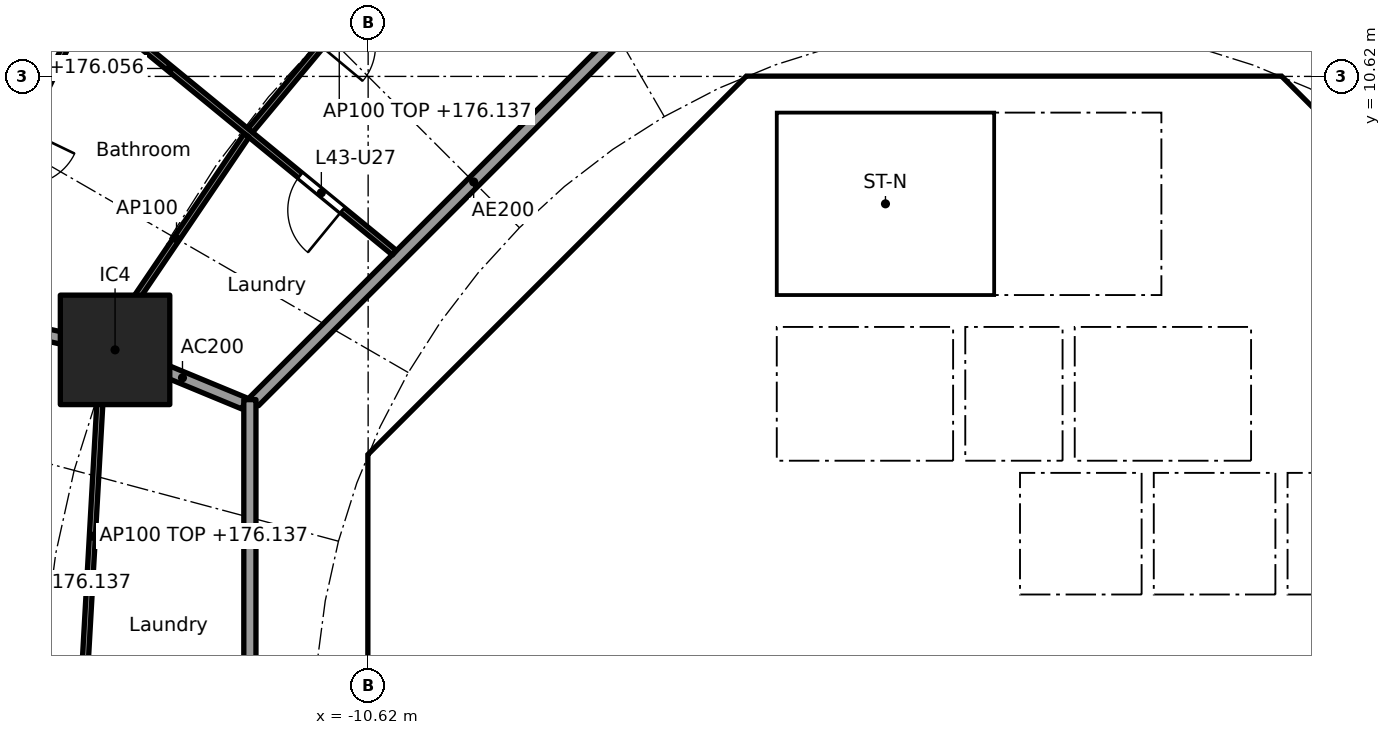
"""IFC4 building model, lengths in metres.
Left out: names, types, materials, properties, quantities, classifications, styles, units other than length and angle.
Written with IfcOpenShell. Run it as: python <this file> out.ifc"""

import sys

from ifc_helpers import new_model, si_unit, direction, frame, frame_2d, origin, origin_2d, place, context, subcontext, project, spatial, polyline, rectangle, outline, extrude, element, fill, save


model = new_model("IFC4")
c1 = context("Model", 3, precision=1e-05, world=origin(), true_north=direction((0.0, 1.0)))
c2 = subcontext(c1, "Body", "Model", "MODEL_VIEW")
j1 = project(units=[si_unit("LENGTHUNIT", "METRE"), si_unit("PLANEANGLEUNIT", "RADIAN")], contexts=[c1])
p1 = place(None, origin())
s1 = spatial("IfcSite", under=j1, at=p1, CompositionType="ELEMENT")
p2 = place(p1, origin())
s2 = spatial("IfcBuilding", under=s1, at=p2, CompositionType="ELEMENT")
p3 = place(p2, frame((0.0, 0.0, 173.3)))
s3 = spatial("IfcBuildingStorey", under=s2, at=p3, CompositionType="ELEMENT", Elevation=173.3)
p4 = place(p3, frame((-14.782, 6.123, 0.0), z_axis=(0.0, 0.0, 1.0), x_axis=(1.0, 0.0, 0.0)))
e1 = element("IfcColumn", 1, at=p4, inside=s3, PredefinedType="COLUMN", context=c2, shape_type="SweptSolid", body=[
    extrude(rectangle(XDim=1.8, YDim=1.8, at=origin_2d()), origin(), (0.0, 0.0, 1.0), 3.7),
])
p5 = place(p3, frame((9.988, 4.613, 0.0), z_axis=(0.0, 0.0, 1.0), x_axis=(-0.707106781187, 0.707106781187, 0.0)))
e2 = element("IfcWall", 2, at=p5, inside=s3, PredefinedType="SHEAR", context=c2, shape_type="SweptSolid", body=[
    extrude(rectangle(XDim=7.602, YDim=0.6, at=frame_2d((3.801, 0.0))), origin(), (0.0, 0.0, 1.0), 3.44),
])
p6 = place(p5, frame((3.201, 0.0, 0.0)))
e3 = element("IfcOpeningElement", 3, at=p6, cuts=e2, PredefinedType="OPENING", context=c2, shape_type="SweptSolid", body=[
    extrude(rectangle(XDim=1.2, YDim=2.1, at=frame_2d((0.6, 1.05))), frame((0.0, 0.31, 0.0), z_axis=(0.0, -1.0, 0.0), x_axis=(1.0, 0.0, 0.0)), (0.0, 0.0, 1.0), 0.62),
])
p7 = place(p3, frame((-4.613, 9.988, 0.0), z_axis=(0.0, 0.0, 1.0), x_axis=(-0.707106781187, -0.707106781187, 0.0)))
e4 = element("IfcWall", 4, at=p7, inside=s3, PredefinedType="SHEAR", context=c2, shape_type="SweptSolid", body=[
    extrude(rectangle(XDim=7.602, YDim=0.6, at=frame_2d((3.801, 0.0))), origin(), (0.0, 0.0, 1.0), 3.44),
])
p8 = place(p7, frame((0.351, 0.0, 0.0)))
e5 = element("IfcOpeningElement", 5, at=p8, cuts=e4, PredefinedType="OPENING", context=c2, shape_type="SweptSolid", body=[
    extrude(rectangle(XDim=1.1, YDim=2.1, at=frame_2d((0.55, 1.05))), frame((0.0, 0.31, 0.0), z_axis=(0.0, -1.0, 0.0), x_axis=(1.0, 0.0, 0.0)), (0.0, 0.0, 1.0), 0.62),
])
p9 = place(p3, frame((-10.325, 3.801, 0.0), z_axis=(0.0, 0.0, 1.0), x_axis=(0.0, -1.0, 0.0)))
e6 = element("IfcWall", 6, at=p9, inside=s3, PredefinedType="SHEAR", context=c2, shape_type="SweptSolid", body=[
    extrude(rectangle(XDim=7.602, YDim=0.6, at=frame_2d((3.801, 0.0))), origin(), (0.0, 0.0, 1.0), 3.44),
])
p10 = place(p9, frame((0.651, 0.0, 0.0)))
e7 = element("IfcOpeningElement", 7, at=p10, cuts=e6, PredefinedType="OPENING", context=c2, shape_type="SweptSolid", body=[
    extrude(rectangle(XDim=1.5, YDim=2.1, at=frame_2d((0.75, 1.05))), frame((0.0, 0.31, 0.0), z_axis=(0.0, -1.0, 0.0), x_axis=(1.0, 0.0, 0.0)), (0.0, 0.0, 1.0), 0.62),
])
p11 = place(p9, frame((5.451, 0.0, 0.0)))
e8 = element("IfcOpeningElement", 8, at=p11, cuts=e6, PredefinedType="OPENING", context=c2, shape_type="SweptSolid", body=[
    extrude(rectangle(XDim=1.5, YDim=2.1, at=frame_2d((0.75, 1.05))), frame((0.0, 0.31, 0.0), z_axis=(0.0, -1.0, 0.0), x_axis=(1.0, 0.0, 0.0)), (0.0, 0.0, 1.0), 0.62),
])
p12 = place(p3, frame((-5.8, 4.3, 0.0), z_axis=(0.0, 0.0, 1.0), x_axis=(0.0, 1.0, 0.0)))
e9 = element("IfcWall", 9, at=p12, inside=s3, PredefinedType="PARTITIONING", context=c2, shape_type="SweptSolid", body=[
    extrude(rectangle(XDim=3.927, YDim=0.15, at=frame_2d((1.963, 0.0))), origin(), (0.0, 0.0, 1.0), 3.44),
])
p13 = place(p12, frame((0.413, 0.0, 0.0)))
e10 = element("IfcOpeningElement", 10, at=p13, cuts=e9, PredefinedType="OPENING", context=c2, shape_type="SweptSolid", body=[
    extrude(rectangle(XDim=0.9, YDim=2.1, at=frame_2d((0.45, 1.05))), frame((0.0, 0.085, 0.0), z_axis=(0.0, -1.0, 0.0), x_axis=(1.0, 0.0, 0.0)), (0.0, 0.0, 1.0), 0.17),
])
p14 = place(p12, frame((2.489, 0.0, 0.0)))
e11 = element("IfcOpeningElement", 11, at=p14, cuts=e9, PredefinedType="OPENING", context=c2, shape_type="SweptSolid", body=[
    extrude(rectangle(XDim=0.9, YDim=2.1, at=frame_2d((0.45, 1.05))), frame((0.0, 0.085, 0.0), z_axis=(0.0, -1.0, 0.0), x_axis=(1.0, 0.0, 0.0)), (0.0, 0.0, 1.0), 0.17),
])
p15 = place(p3, frame((4.0, 4.3, 0.0), z_axis=(0.0, 0.0, 1.0), x_axis=(0.0, 1.0, 0.0)))
e12 = element("IfcWall", 12, at=p15, inside=s3, PredefinedType="SOLIDWALL", context=c2, shape_type="SweptSolid", body=[
    extrude(rectangle(XDim=2.2, YDim=0.2, at=frame_2d((1.1, 0.0))), origin(), (0.0, 0.0, 1.0), 3.44),
])
p16 = place(p15, frame((0.55, 0.0, 0.0)))
e13 = element("IfcOpeningElement", 13, at=p16, cuts=e12, PredefinedType="OPENING", context=c2, shape_type="SweptSolid", body=[
    extrude(rectangle(XDim=1.1, YDim=2.1, at=frame_2d((0.55, 1.05))), frame((0.0, 0.11, 0.0), z_axis=(0.0, -1.0, 0.0), x_axis=(1.0, 0.0, 0.0)), (0.0, 0.0, 1.0), 0.22),
])
p17 = place(p3, frame((-4.0, 4.3, 0.0), z_axis=(0.0, 0.0, 1.0), x_axis=(0.0, 1.0, 0.0)))
e14 = element("IfcWall", 14, at=p17, inside=s3, PredefinedType="SOLIDWALL", context=c2, shape_type="SweptSolid", body=[
    extrude(rectangle(XDim=2.2, YDim=0.2, at=frame_2d((1.1, 0.0))), origin(), (0.0, 0.0, 1.0), 3.44),
])
p18 = place(p17, frame((0.55, 0.0, 0.0)))
e15 = element("IfcOpeningElement", 15, at=p18, cuts=e14, PredefinedType="OPENING", context=c2, shape_type="SweptSolid", body=[
    extrude(rectangle(XDim=1.1, YDim=2.1, at=frame_2d((0.55, 1.05))), frame((0.0, 0.11, 0.0), z_axis=(0.0, -1.0, 0.0), x_axis=(1.0, 0.0, 0.0)), (0.0, 0.0, 1.0), 0.22),
])
p19 = place(p3, frame((-6.7, 2.0, 0.0), z_axis=(0.0, 0.0, 1.0), x_axis=(1.0, 0.0, 0.0)))
e16 = element("IfcWall", 16, at=p19, inside=s3, PredefinedType="SOLIDWALL", context=c2, shape_type="SweptSolid", body=[
    extrude(rectangle(XDim=13.4, YDim=0.2, at=frame_2d((6.7, 0.0))), origin(), (0.0, 0.0, 1.0), 3.44),
])
p20 = place(p19, frame((7.25, 0.0, 0.0)))
e17 = element("IfcOpeningElement", 17, at=p20, cuts=e16, PredefinedType="OPENING", context=c2, shape_type="SweptSolid", body=[
    extrude(rectangle(XDim=1.1, YDim=2.1, at=frame_2d((0.55, 1.05))), frame((0.0, 0.11, 0.0), z_axis=(0.0, -1.0, 0.0), x_axis=(1.0, 0.0, 0.0)), (0.0, 0.0, 1.0), 0.22),
])
p21 = place(p19, frame((9.45, 0.0, 0.0)))
e18 = element("IfcOpeningElement", 18, at=p21, cuts=e16, PredefinedType="OPENING", context=c2, shape_type="SweptSolid", body=[
    extrude(rectangle(XDim=1.1, YDim=2.1, at=frame_2d((0.55, 1.05))), frame((0.0, 0.11, 0.0), z_axis=(0.0, -1.0, 0.0), x_axis=(1.0, 0.0, 0.0)), (0.0, 0.0, 1.0), 0.22),
])
p22 = place(p19, frame((0.75, 0.0, 0.0)))
e19 = element("IfcOpeningElement", 19, at=p22, cuts=e16, PredefinedType="OPENING", context=c2, shape_type="SweptSolid", body=[
    extrude(rectangle(XDim=0.9, YDim=2.1, at=frame_2d((0.45, 1.05))), frame((0.0, 0.11, 0.0), z_axis=(0.0, -1.0, 0.0), x_axis=(1.0, 0.0, 0.0)), (0.0, 0.0, 1.0), 0.22),
])
p23 = place(p19, frame((4.05, 0.0, 0.0)))
e20 = element("IfcOpeningElement", 20, at=p23, cuts=e16, PredefinedType="OPENING", context=c2, shape_type="SweptSolid", body=[
    extrude(rectangle(XDim=0.9, YDim=2.1, at=frame_2d((0.45, 1.05))), frame((0.0, 0.11, 0.0), z_axis=(0.0, -1.0, 0.0), x_axis=(1.0, 0.0, 0.0)), (0.0, 0.0, 1.0), 0.22),
])
p24 = place(p3, frame((4.0, 7.025, 0.0), z_axis=(0.0, 0.0, 1.0), x_axis=(0.0, 1.0, 0.0)))
e21 = element("IfcWall", 21, at=p24, inside=s3, PredefinedType="SOLIDWALL", context=c2, shape_type="SweptSolid", body=[
    extrude(rectangle(XDim=3.0, YDim=0.2, at=frame_2d((1.5, 0.0))), origin(), (0.0, 0.0, 1.0), 3.44),
])
p25 = place(p24, frame((0.925, 0.0, 0.0)))
e22 = element("IfcOpeningElement", 22, at=p25, cuts=e21, PredefinedType="OPENING", context=c2, shape_type="SweptSolid", body=[
    extrude(rectangle(XDim=1.1, YDim=2.1, at=frame_2d((0.55, 1.05))), frame((0.0, 0.11, 0.0), z_axis=(0.0, -1.0, 0.0), x_axis=(1.0, 0.0, 0.0)), (0.0, 0.0, 1.0), 0.22),
])
p26 = place(p3, origin())
e23 = element("IfcWall", 23, at=p26, inside=s3, PredefinedType="SHEAR", context=c2, shape_type="SweptSolid", body=[
    extrude(outline(polyline([(-10.2, 4.825), (-9.776, 4.401), (-10.025, 4.152), (-10.025, 3.801), (-10.625, 3.801), (-10.625, 4.401), (-10.2, 4.825)])), origin(), (0.0, 0.0, 1.0), 3.44),
])
p27 = place(p3, origin())
e24 = element("IfcWall", 24, at=p27, inside=s3, PredefinedType="SHEAR", context=c2, shape_type="SweptSolid", body=[
    extrude(outline(polyline([(-4.152, 10.025), (-4.401, 9.776), (-4.825, 10.2), (-4.401, 10.625), (4.401, 10.625), (4.825, 10.2), (4.401, 9.776), (4.152, 10.025), (-4.152, 10.025)])), origin(), (0.0, 0.0, 1.0), 3.44),
])
p28 = place(p3, frame((-10.025, 4.0, 0.0), z_axis=(0.0, 0.0, 1.0), x_axis=(1.0, 0.0, 0.0)))
e25 = element("IfcWall", 25, at=p28, inside=s3, PredefinedType="PARTITIONING", context=c2, shape_type="SweptSolid", body=[
    extrude(rectangle(XDim=3.325, YDim=0.2, at=frame_2d((1.662, 0.0))), origin(), (0.0, 0.0, 1.0), 3.44),
])
p29 = place(p3, frame((-8.001, 6.1, 0.0), z_axis=(0.0, 0.0, 1.0), x_axis=(1.0, 0.0, 0.0)))
e26 = element("IfcWall", 26, at=p29, inside=s3, PredefinedType="PARTITIONING", context=c2, shape_type="SweptSolid", body=[
    extrude(rectangle(XDim=2.126, YDim=0.15, at=frame_2d((1.063, 0.0))), origin(), (0.0, 0.0, 1.0), 3.44),
])
for number, where, z_axis, x_axis in (
    (27, (-0.9, 4.3, 0.0), (0.0, 0.0, 1.0), (0.0, 1.0, 0.0)),
    (28, (0.9, 4.3, 0.0), (0.0, 0.0, 1.0), (0.0, 1.0, 0.0)),
):
    element("IfcWall", number, at=place(p3, frame(where, z_axis=z_axis, x_axis=x_axis)), inside=s3, PredefinedType="SOLIDWALL", context=c2, shape_type="SweptSolid", body=[
        extrude(rectangle(XDim=2.2, YDim=0.2, at=frame_2d((1.1, 0.0))), origin(), (0.0, 0.0, 1.0), 3.44),
    ])
p30 = place(p3, origin())
e29 = element("IfcWall", 29, at=p30, inside=s3, PredefinedType="SOLIDWALL", context=c2, shape_type="SweptSolid", body=[
    extrude(outline(polyline([(-6.7, 4.3), (6.7, 4.3), (6.7, 2.1), (6.5, 2.1), (6.5, 4.1), (4.5, 4.1), (4.5, 2.1), (4.3, 2.1), (4.3, 4.1), (2.3, 4.1), (2.3, 2.1), (2.1, 2.1), (2.1, 4.1), (0.1, 4.1), (0.1, 2.1), (-0.1, 2.1), (-0.1, 4.1), (-4.3, 4.1), (-4.3, 2.1), (-4.5, 2.1), (-4.5, 4.1), (-6.5, 4.1), (-6.5, 2.1), (-6.7, 2.1), (-6.7, 4.3)])), origin(), (0.0, 0.0, 1.0), 3.44),
])
p31 = place(p3, origin())
e30 = element("IfcWall", 30, at=p31, inside=s3, PredefinedType="SOLIDWALL", context=c2, shape_type="SweptSolid", body=[
    extrude(outline(polyline([(-3.9, 7.025), (-4.1, 7.025), (-4.1, 10.025), (-3.9, 10.025), (-3.9, 7.025)])), origin(), (0.0, 0.0, 1.0), 3.44),
])
p32 = place(p3, origin())
e31 = element("IfcWall", 31, at=p32, inside=s3, PredefinedType="SOLIDWALL", context=c2, shape_type="SweptSolid", body=[
    extrude(outline(polyline([(4.1, 6.5), (-4.1, 6.5), (-4.1, 7.025), (4.1, 7.025), (4.1, 6.5)])), origin(), (0.0, 0.0, 1.0), 3.44),
])
p33 = place(p3, frame((-12.657, 5.243, 0.0), z_axis=(0.0, 0.0, 1.0), x_axis=(-0.923859888513, 0.38273085373, 0.0)))
e32 = element("IfcWall", 32, at=p33, inside=s3, PredefinedType="PARTITIONING", context=c2, shape_type="SweptSolid", body=[
    extrude(rectangle(XDim=2.199, YDim=0.2, at=frame_2d((1.1, 0.0))), origin(), (0.0, 0.0, 1.0), 3.44),
])
p34 = place(p3, frame((-14.831, 6.134, 0.0), z_axis=(0.0, 0.0, 1.0), x_axis=(-0.976568396888, 0.215207263354, 0.0)))
e33 = element("IfcWall", 33, at=p34, inside=s3, PredefinedType="PARTITIONING", context=c2, shape_type="SweptSolid", body=[
    extrude(rectangle(XDim=5.177, YDim=0.2, at=frame_2d((2.588, 0.0))), origin(), (0.0, 0.0, 1.0), 2.837),
])
p35 = place(p3, frame((-5.275, 12.494, 0.0), z_axis=(0.0, 0.0, 1.0), x_axis=(-0.707106781187, -0.707106781187, 0.0)))
e34 = element("IfcWall", 34, at=p35, inside=s3, PredefinedType="PARTITIONING", context=c2, shape_type="SweptSolid", body=[
    extrude(rectangle(XDim=10.209, YDim=0.2, at=frame_2d((5.104, 0.0))), origin(), (0.0, 0.0, 1.0), 3.44),
])
p36 = place(p3, frame((-12.565, 5.304, 0.0), z_axis=(0.0, 0.0, 1.0), x_axis=(0.0, -1.0, 0.0)))
e35 = element("IfcWall", 35, at=p36, inside=s3, PredefinedType="PARTITIONING", context=c2, shape_type="SweptSolid", body=[
    extrude(rectangle(XDim=10.409, YDim=0.2, at=frame_2d((5.205, 0.0))), origin(), (0.0, 0.0, 1.0), 3.44),
])
p37 = place(p36, frame((6.106, 0.0, 0.0)))
e36 = element("IfcOpeningElement", 36, at=p37, cuts=e35, PredefinedType="OPENING", context=c2, shape_type="SweptSolid", body=[
    extrude(rectangle(XDim=1.0, YDim=2.1, at=frame_2d((0.5, 1.05))), frame((0.0, 0.11, 0.0), z_axis=(0.0, -1.0, 0.0), x_axis=(1.0, 0.0, 0.0)), (0.0, 0.0, 1.0), 0.22),
])
p38 = place(p3, frame((-9.631, 13.242, 0.0), z_axis=(0.0, 0.0, 1.0), x_axis=(-0.640315711982, -0.768111833647, 0.0)))
e37 = element("IfcWall", 37, at=p38, inside=s3, PredefinedType="PARTITIONING", context=c2, shape_type="SweptSolid", body=[
    extrude(rectangle(XDim=4.572, YDim=0.1, at=frame_2d((2.286, 0.0))), origin(), (0.0, 0.0, 1.0), 2.837),
])
p39 = place(p38, frame((1.861, 0.0, 0.0)))
e38 = element("IfcOpeningElement", 38, at=p39, cuts=e37, PredefinedType="OPENING", context=c2, shape_type="SweptSolid", body=[
    extrude(rectangle(XDim=0.9, YDim=2.1, at=frame_2d((0.45, 1.05))), frame((0.0, 0.06, 0.0), z_axis=(0.0, -1.0, 0.0), x_axis=(1.0, 0.0, 0.0)), (0.0, 0.0, 1.0), 0.12),
])
p40 = place(p3, frame((-10.189, 7.721, 0.0), z_axis=(0.0, 0.0, 1.0), x_axis=(-0.773134429339, 0.634242188892, 0.0)))
e39 = element("IfcWall", 39, at=p40, inside=s3, PredefinedType="PARTITIONING", context=c2, shape_type="SweptSolid", body=[
    extrude(rectangle(XDim=9.552, YDim=0.1, at=frame_2d((4.776, 0.0))), origin(), (0.0, 0.0, 1.0), 2.756),
])
p41 = place(p40, frame((7.59, 0.0, 0.0)))
e40 = element("IfcOpeningElement", 40, at=p41, cuts=e39, PredefinedType="OPENING", context=c2, shape_type="SweptSolid", body=[
    extrude(rectangle(XDim=0.9, YDim=2.1, at=frame_2d((0.45, 1.05))), frame((0.0, 0.06, 0.0), z_axis=(0.0, -1.0, 0.0), x_axis=(1.0, 0.0, 0.0)), (0.0, 0.0, 1.0), 0.12),
])
p42 = place(p40, frame((1.104, 0.0, 0.0)))
e41 = element("IfcOpeningElement", 41, at=p42, cuts=e39, PredefinedType="OPENING", context=c2, shape_type="SweptSolid", body=[
    extrude(rectangle(XDim=0.9, YDim=2.1, at=frame_2d((0.45, 1.05))), frame((0.0, 0.06, 0.0), z_axis=(0.0, -1.0, 0.0), x_axis=(1.0, 0.0, 0.0)), (0.0, 0.0, 1.0), 0.12),
])
p43 = place(p3, frame((-12.619, 9.65, 0.0), z_axis=(0.0, 0.0, 1.0), x_axis=(-0.561046521684, -0.82778427172, 0.0)))
e42 = element("IfcWall", 42, at=p43, inside=s3, PredefinedType="PARTITIONING", context=c2, shape_type="SweptSolid", body=[
    extrude(rectangle(XDim=4.109, YDim=0.1, at=frame_2d((2.054, 0.0))), origin(), (0.0, 0.0, 1.0), 3.44),
])
p44 = place(p3, frame((-15.257, 11.816, 0.0), z_axis=(0.0, 0.0, 1.0), x_axis=(-0.434027506504, -0.900899619046, 0.0)))
e43 = element("IfcWall", 43, at=p44, inside=s3, PredefinedType="PARTITIONING", context=c2, shape_type="SweptSolid", body=[
    extrude(rectangle(XDim=5.508, YDim=0.1, at=frame_2d((2.754, 0.0))), origin(), (0.0, 0.0, 1.0), 3.44),
])
p45 = place(p44, frame((2.304, 0.0, 0.0)))
e44 = element("IfcOpeningElement", 44, at=p45, cuts=e43, PredefinedType="OPENING", context=c2, shape_type="SweptSolid", body=[
    extrude(rectangle(XDim=0.9, YDim=2.1, at=frame_2d((0.45, 1.05))), frame((0.0, 0.06, 0.0), z_axis=(0.0, -1.0, 0.0), x_axis=(1.0, 0.0, 0.0)), (0.0, 0.0, 1.0), 0.12),
])
p46 = place(p3, frame((-14.986, 6.067, 0.0), z_axis=(0.0, 0.0, 1.0), x_axis=(-0.056311398802, -0.998413254302, 0.0)))
e45 = element("IfcWall", 45, at=p46, inside=s3, PredefinedType="PARTITIONING", context=c2, shape_type="SweptSolid", body=[
    extrude(rectangle(XDim=6.026, YDim=0.1, at=frame_2d((3.013, 0.0))), origin(), (0.0, 0.0, 1.0), 2.837),
])
p47 = place(p20, origin())
e46 = element("IfcDoor", 46, at=p47, inside=s3, OperationType="DOUBLE_DOOR_SLIDING", PredefinedType="DOOR", context=c2, shape_type="SweptSolid", body=[
    extrude(rectangle(XDim=1.1, YDim=2.1, at=frame_2d((0.55, 1.05))), frame((0.0, 0.025, 0.0), z_axis=(0.0, -1.0, 0.0), x_axis=(1.0, 0.0, 0.0)), (0.0, 0.0, 1.0), 0.05),
])
fill(e17, e46)
p48 = place(p21, origin())
e47 = element("IfcDoor", 47, at=p48, inside=s3, OperationType="DOUBLE_DOOR_SLIDING", PredefinedType="DOOR", context=c2, shape_type="SweptSolid", body=[
    extrude(rectangle(XDim=1.1, YDim=2.1, at=frame_2d((0.55, 1.05))), frame((0.0, 0.025, 0.0), z_axis=(0.0, -1.0, 0.0), x_axis=(1.0, 0.0, 0.0)), (0.0, 0.0, 1.0), 0.05),
])
fill(e18, e47)
p49 = place(p16, origin())
e48 = element("IfcDoor", 48, at=p49, inside=s3, OperationType="DOUBLE_DOOR_SLIDING", PredefinedType="DOOR", context=c2, shape_type="SweptSolid", body=[
    extrude(rectangle(XDim=1.1, YDim=2.1, at=frame_2d((0.55, 1.05))), frame((0.0, 0.025, 0.0), z_axis=(0.0, -1.0, 0.0), x_axis=(1.0, 0.0, 0.0)), (0.0, 0.0, 1.0), 0.05),
])
fill(e13, e48)
p50 = place(p18, origin())
e49 = element("IfcDoor", 49, at=p50, inside=s3, OperationType="DOUBLE_DOOR_SLIDING", PredefinedType="DOOR", context=c2, shape_type="SweptSolid", body=[
    extrude(rectangle(XDim=1.1, YDim=2.1, at=frame_2d((0.55, 1.05))), frame((0.0, 0.025, 0.0), z_axis=(0.0, -1.0, 0.0), x_axis=(1.0, 0.0, 0.0)), (0.0, 0.0, 1.0), 0.05),
])
fill(e15, e49)
p51 = place(p25, origin())
e50 = element("IfcDoor", 50, at=p51, inside=s3, OperationType="SINGLE_SWING_RIGHT", PredefinedType="DOOR", context=c2, shape_type="SweptSolid", body=[
    extrude(rectangle(XDim=1.1, YDim=2.1, at=frame_2d((0.55, 1.05))), frame((0.0, 0.025, 0.0), z_axis=(0.0, -1.0, 0.0), x_axis=(1.0, 0.0, 0.0)), (0.0, 0.0, 1.0), 0.05),
])
fill(e22, e50)
p52 = place(p13, origin())
e51 = element("IfcDoor", 51, at=p52, inside=s3, OperationType="SINGLE_SWING_LEFT", PredefinedType="DOOR", context=c2, shape_type="SweptSolid", body=[
    extrude(rectangle(XDim=0.9, YDim=2.1, at=frame_2d((0.45, 1.05))), frame((0.0, 0.025, 0.0), z_axis=(0.0, -1.0, 0.0), x_axis=(1.0, 0.0, 0.0)), (0.0, 0.0, 1.0), 0.05),
])
fill(e10, e51)
p53 = place(p14, origin())
e52 = element("IfcDoor", 52, at=p53, inside=s3, OperationType="SINGLE_SWING_LEFT", PredefinedType="DOOR", context=c2, shape_type="SweptSolid", body=[
    extrude(rectangle(XDim=0.9, YDim=2.1, at=frame_2d((0.45, 1.05))), frame((0.0, 0.025, 0.0), z_axis=(0.0, -1.0, 0.0), x_axis=(1.0, 0.0, 0.0)), (0.0, 0.0, 1.0), 0.05),
])
fill(e11, e52)
p54 = place(p22, origin())
e53 = element("IfcDoor", 53, at=p54, inside=s3, OperationType="SINGLE_SWING_RIGHT", PredefinedType="DOOR", context=c2, shape_type="SweptSolid", body=[
    extrude(rectangle(XDim=0.9, YDim=2.1, at=frame_2d((0.45, 1.05))), frame((0.0, 0.025, 0.0), z_axis=(0.0, -1.0, 0.0), x_axis=(1.0, 0.0, 0.0)), (0.0, 0.0, 1.0), 0.05),
])
fill(e19, e53)
p55 = place(p23, origin())
e54 = element("IfcDoor", 54, at=p55, inside=s3, OperationType="SINGLE_SWING_RIGHT", PredefinedType="DOOR", context=c2, shape_type="SweptSolid", body=[
    extrude(rectangle(XDim=0.9, YDim=2.1, at=frame_2d((0.45, 1.05))), frame((0.0, 0.025, 0.0), z_axis=(0.0, -1.0, 0.0), x_axis=(1.0, 0.0, 0.0)), (0.0, 0.0, 1.0), 0.05),
])
fill(e20, e54)
p56 = place(p10, origin())
e55 = element("IfcDoor", 55, at=p56, inside=s3, OperationType="DOUBLE_DOOR_SINGLE_SWING", PredefinedType="DOOR", context=c2, shape_type="SweptSolid", body=[
    extrude(rectangle(XDim=1.5, YDim=2.1, at=frame_2d((0.75, 1.05))), frame((0.0, 0.025, 0.0), z_axis=(0.0, -1.0, 0.0), x_axis=(1.0, 0.0, 0.0)), (0.0, 0.0, 1.0), 0.05),
])
fill(e7, e55)
p57 = place(p8, origin())
e56 = element("IfcDoor", 56, at=p57, inside=s3, OperationType="SINGLE_SWING_RIGHT", PredefinedType="DOOR", context=c2, shape_type="SweptSolid", body=[
    extrude(rectangle(XDim=1.1, YDim=2.1, at=frame_2d((0.55, 1.05))), frame((0.0, 0.025, 0.0), z_axis=(0.0, -1.0, 0.0), x_axis=(1.0, 0.0, 0.0)), (0.0, 0.0, 1.0), 0.05),
])
fill(e5, e56)
p58 = place(p42, origin())
e57 = element("IfcDoor", 57, at=p58, inside=s3, OperationType="SINGLE_SWING_LEFT", PredefinedType="DOOR", context=c2, shape_type="SweptSolid", body=[
    extrude(rectangle(XDim=0.9, YDim=2.1, at=frame_2d((0.45, 1.05))), frame((0.0, 0.025, 0.0), z_axis=(0.0, -1.0, 0.0), x_axis=(1.0, 0.0, 0.0)), (0.0, 0.0, 1.0), 0.05),
])
fill(e41, e57)
save(model, sys.argv[1])
